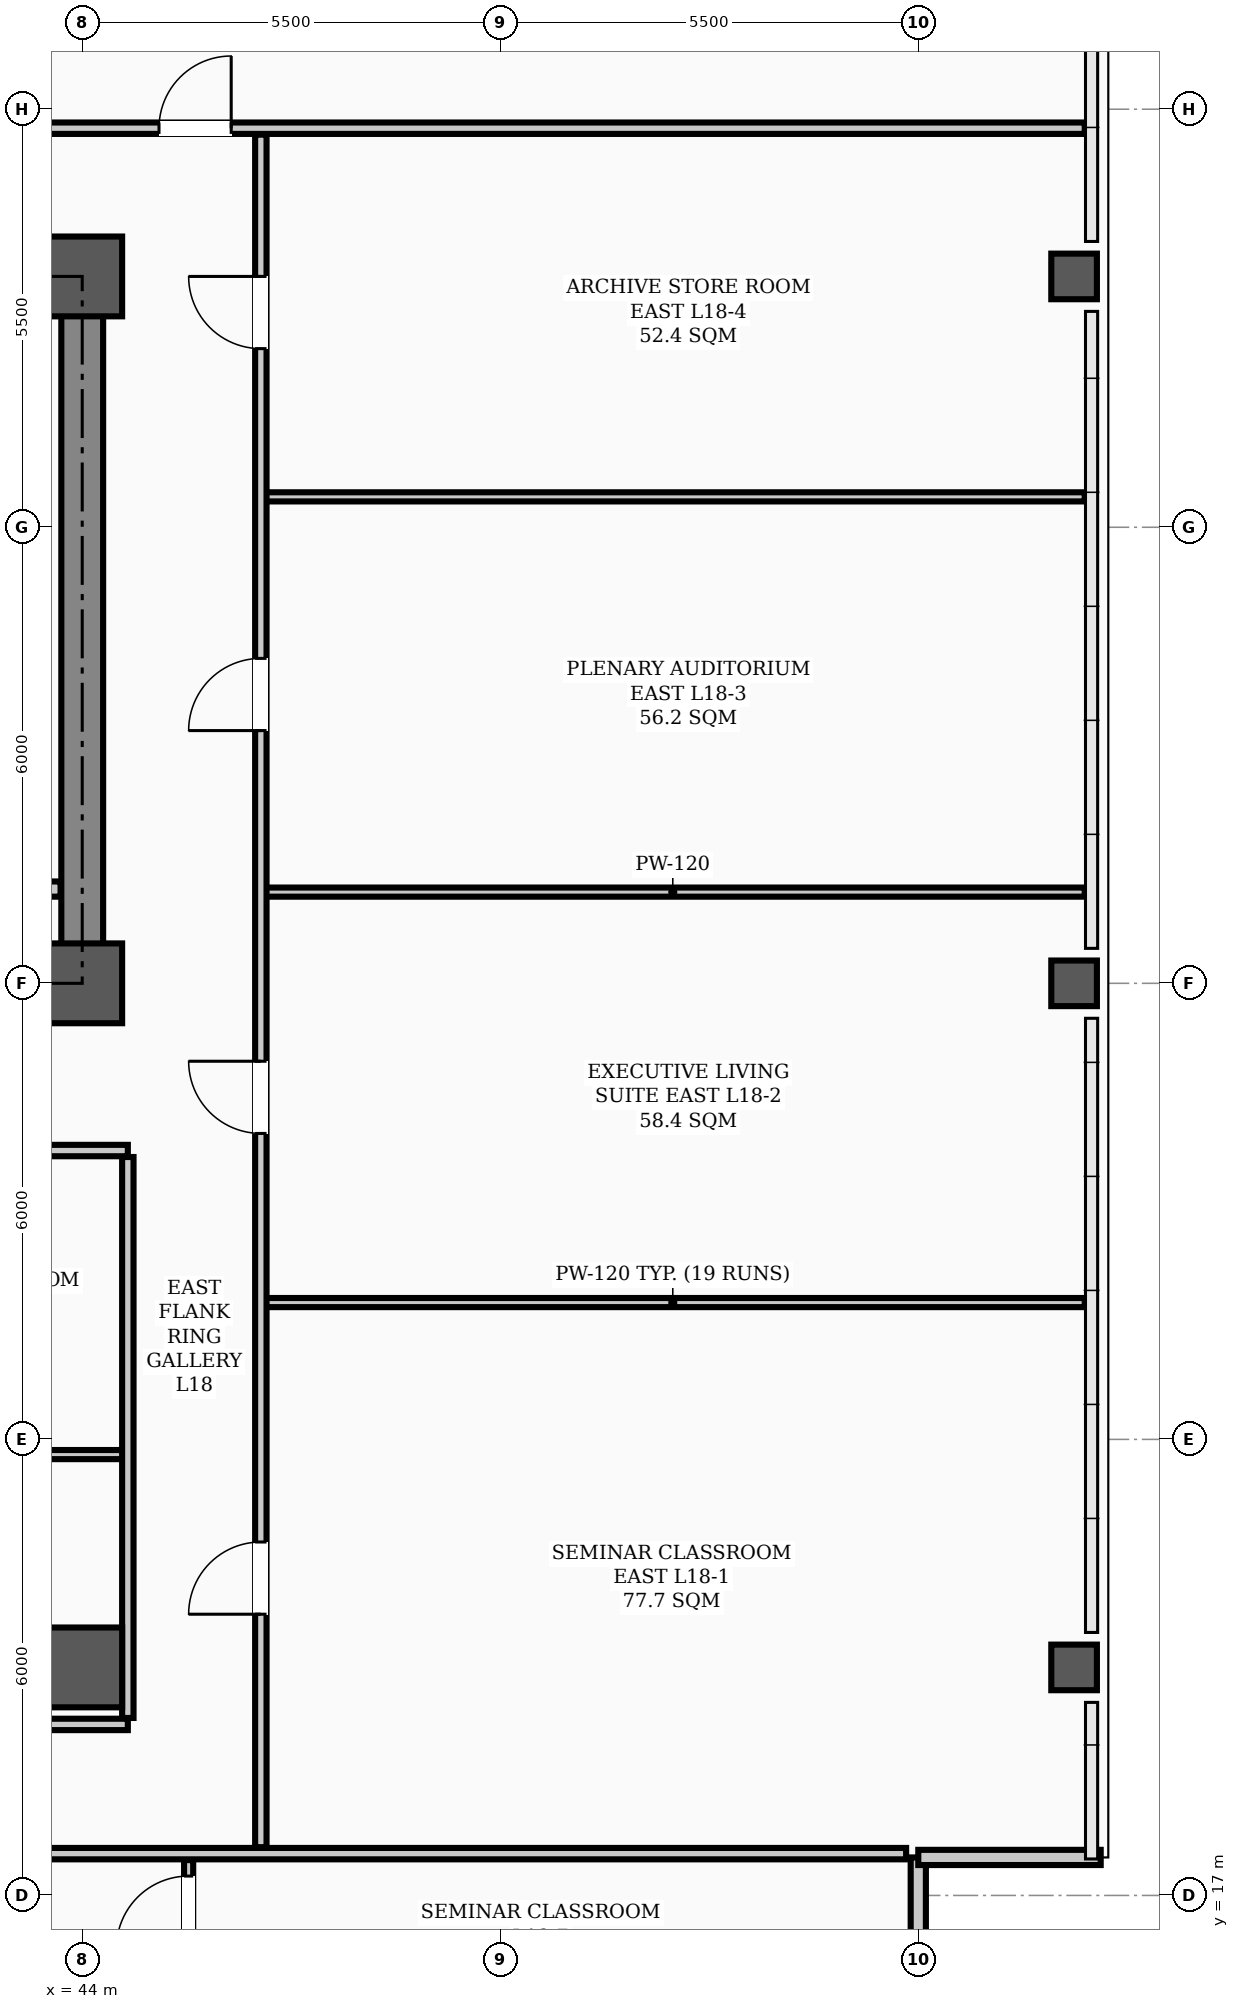
"""IFC4 building model, lengths in metres.
Left out: names, types, materials, properties, quantities, classifications, styles, units other than length and angle.
Written with IfcOpenShell. Run it as: python <this file> out.ifc"""

import sys

from ifc_helpers import new_model, si_unit, direction, frame, frame_2d, origin, origin_2d, place, context, subcontext, project, spatial, rectangle, hollow_rectangle, extrude, element, fill, save


model = new_model("IFC4")
c1 = context("Model", 3, precision=1e-05, world=origin(), true_north=direction((0.0, 1.0)))
c2 = subcontext(c1, "Body", "Model", "MODEL_VIEW")
j1 = project(units=[si_unit("LENGTHUNIT", "METRE"), si_unit("PLANEANGLEUNIT", "RADIAN")], contexts=[c1])
p1 = place(None, origin())
s1 = spatial("IfcSite", under=j1, at=p1, CompositionType="ELEMENT")
p2 = place(p1, origin())
s2 = spatial("IfcBuilding", under=s1, at=p2, CompositionType="ELEMENT")
p3 = place(p2, frame((0.0, 0.0, 73.3)))
s3 = spatial("IfcBuildingStorey", under=s2, at=p3, CompositionType="ELEMENT", Elevation=73.3)
for number, where, z_axis, x_axis in (
    (1, (44.0, 29.0, 0.0), (0.0, 0.0, 1.0), (1.0, 0.0, 0.0)),
    (2, (44.0, 38.3, 0.0), (0.0, 0.0, 1.0), (1.0, 0.0, 0.0)),
    (3, (44.0, 20.0, 0.0), (0.0, 0.0, 1.0), (1.0, 0.0, 0.0)),
):
    element("IfcColumn", number, at=place(p3, frame(where, z_axis=z_axis, x_axis=x_axis)), inside=s3, PredefinedType="COLUMN", context=c2, shape_type="SweptSolid", body=[
        extrude(hollow_rectangle(XDim=1.05, YDim=1.05, WallThickness=0.038, InnerFilletRadius=0.019, OuterFilletRadius=0.057, at=origin_2d()), origin(), (0.0, 0.0, 1.0), 3.9),
    ])
for number, where, z_axis, x_axis in (
    (4, (57.05, 20.0, 0.0), (0.0, 0.0, 1.0), (1.0, 0.0, 0.0)),
    (5, (57.05, 29.0, 0.0), (0.0, 0.0, 1.0), (1.0, 0.0, 0.0)),
    (6, (57.05, 38.3, 0.0), (0.0, 0.0, 1.0), (1.0, 0.0, 0.0)),
):
    element("IfcColumn", number, at=place(p3, frame(where, z_axis=z_axis, x_axis=x_axis)), inside=s3, PredefinedType="COLUMN", context=c2, shape_type="SweptSolid", body=[
        extrude(hollow_rectangle(XDim=0.6, YDim=0.6, WallThickness=0.026, InnerFilletRadius=0.013, OuterFilletRadius=0.039, at=origin_2d()), origin(), (0.0, 0.0, 1.0), 3.9),
    ])
for number, where, z_axis, x_axis in (
    (7, (55.0, 15.1, 0.0), (0.0, 0.0, 1.0), (0.0, 1.0, 0.0)),
    (8, (55.0, 17.5, 0.0), (0.0, 0.0, 1.0), (1.0, 0.0, 0.0)),
):
    element("IfcWall", number, at=place(p3, frame(where, z_axis=z_axis, x_axis=x_axis)), inside=s3, PredefinedType="PARAPET", context=c2, shape_type="SweptSolid", body=[
        extrude(rectangle(XDim=2.4, YDim=0.2, at=frame_2d((1.2, 0.0))), origin(), (0.0, 0.0, 1.0), 1.2),
    ])
p4 = place(p3, frame((13.5, 29.0, 0.0), z_axis=(0.0, 0.0, 1.0), x_axis=(1.0, 0.0, 0.0)))
e9 = element("IfcWall", 9, at=p4, inside=s3, PredefinedType="SHEAR", context=c2, shape_type="SweptSolid", body=[
    extrude(rectangle(XDim=30.5, YDim=0.55, at=frame_2d((15.25, 0.0))), origin(), (0.0, 0.0, 1.0), 3.72),
])
p5 = place(p4, frame((1.75, 0.0, 0.0)))
e10 = element("IfcOpeningElement", 10, at=p5, cuts=e9, PredefinedType="OPENING", context=c2, shape_type="SweptSolid", body=[
    extrude(rectangle(XDim=1.1, YDim=2.08, at=frame_2d((0.55, 1.04))), frame((0.0, 0.285, 0.0), z_axis=(0.0, -1.0, 0.0), x_axis=(1.0, 0.0, 0.0)), (0.0, 0.0, 1.0), 0.57),
])
p6 = place(p4, frame((26.7, 0.0, 0.0)))
e11 = element("IfcOpeningElement", 11, at=p6, cuts=e9, PredefinedType="OPENING", context=c2, shape_type="SweptSolid", body=[
    extrude(rectangle(XDim=1.1, YDim=2.08, at=frame_2d((0.55, 1.04))), frame((0.0, 0.285, 0.0), z_axis=(0.0, -1.0, 0.0), x_axis=(1.0, 0.0, 0.0)), (0.0, 0.0, 1.0), 0.57),
])
p7 = place(p4, frame((6.8, 0.0, 0.0)))
e12 = element("IfcOpeningElement", 12, at=p7, cuts=e9, PredefinedType="OPENING", context=c2, shape_type="SweptSolid", body=[
    extrude(rectangle(XDim=1.1, YDim=2.08, at=frame_2d((0.55, 1.04))), frame((0.0, 0.285, 0.0), z_axis=(0.0, -1.0, 0.0), x_axis=(1.0, 0.0, 0.0)), (0.0, 0.0, 1.0), 0.57),
])
p8 = place(p4, frame((13.2, 0.0, 0.0)))
e13 = element("IfcOpeningElement", 13, at=p8, cuts=e9, PredefinedType="OPENING", context=c2, shape_type="SweptSolid", body=[
    extrude(rectangle(XDim=1.6, YDim=2.08, at=frame_2d((0.8, 1.04))), frame((0.0, 0.285, 0.0), z_axis=(0.0, -1.0, 0.0), x_axis=(1.0, 0.0, 0.0)), (0.0, 0.0, 1.0), 0.57),
])
p9 = place(p4, frame((20.525, 0.0, 0.0)))
e14 = element("IfcOpeningElement", 14, at=p9, cuts=e9, PredefinedType="OPENING", context=c2, shape_type="SweptSolid", body=[
    extrude(rectangle(XDim=0.95, YDim=2.08, at=frame_2d((0.475, 1.04))), frame((0.0, 0.285, 0.0), z_axis=(0.0, -1.0, 0.0), x_axis=(1.0, 0.0, 0.0)), (0.0, 0.0, 1.0), 0.57),
])
p10 = place(p3, frame((13.5, 38.3, 0.0), z_axis=(0.0, 0.0, 1.0), x_axis=(1.0, 0.0, 0.0)))
e15 = element("IfcWall", 15, at=p10, inside=s3, PredefinedType="SHEAR", context=c2, shape_type="SweptSolid", body=[
    extrude(rectangle(XDim=30.5, YDim=0.55, at=frame_2d((15.25, 0.0))), origin(), (0.0, 0.0, 1.0), 3.72),
])
p11 = place(p3, frame((44.0, 29.35, 0.0), z_axis=(0.0, 0.0, 1.0), x_axis=(0.0, 1.0, 0.0)))
e16 = element("IfcWall", 16, at=p11, inside=s3, PredefinedType="SHEAR", context=c2, shape_type="SweptSolid", body=[
    extrude(rectangle(XDim=8.6, YDim=0.55, at=frame_2d((4.3, 0.0))), origin(), (0.0, 0.0, 1.0), 3.72),
])
p12 = place(p3, frame((42.4, 30.24, 0.0), z_axis=(0.0, 0.0, 1.0), x_axis=(1.0, 0.0, 0.0)))
e17 = element("IfcWall", 17, at=p12, inside=s3, PredefinedType="STANDARD", context=c2, shape_type="SweptSolid", body=[
    extrude(rectangle(XDim=1.315, YDim=0.2, at=frame_2d((0.658, 0.0))), origin(), (0.0, 0.0, 1.0), 3.1),
])
p13 = place(p3, frame((12.9, 26.8, 0.0), z_axis=(0.0, 0.0, 1.0), x_axis=(1.0, 0.0, 0.0)))
e18 = element("IfcWall", 18, at=p13, inside=s3, PredefinedType="PARTITIONING", context=c2, shape_type="SweptSolid", body=[
    extrude(rectangle(XDim=31.7, YDim=0.15, at=frame_2d((15.85, 0.0))), origin(), (0.0, 0.0, 1.0), 3.1),
])
p14 = place(p13, frame((13.6, 0.0, 0.0)))
e19 = element("IfcOpeningElement", 19, at=p14, cuts=e18, PredefinedType="OPENING", context=c2, shape_type="SweptSolid", body=[
    extrude(rectangle(XDim=1.6, YDim=2.08, at=frame_2d((0.8, 1.04))), frame((0.0, 0.085, 0.0), z_axis=(0.0, -1.0, 0.0), x_axis=(1.0, 0.0, 0.0)), (0.0, 0.0, 1.0), 0.17),
])
p15 = place(p13, frame((2.475, 0.0, 0.0)))
e20 = element("IfcOpeningElement", 20, at=p15, cuts=e18, PredefinedType="OPENING", context=c2, shape_type="SweptSolid", body=[
    extrude(rectangle(XDim=0.95, YDim=2.08, at=frame_2d((0.475, 1.04))), frame((0.0, 0.085, 0.0), z_axis=(0.0, -1.0, 0.0), x_axis=(1.0, 0.0, 0.0)), (0.0, 0.0, 1.0), 0.17),
])
p16 = place(p13, frame((9.125, 0.0, 0.0)))
e21 = element("IfcOpeningElement", 21, at=p16, cuts=e18, PredefinedType="OPENING", context=c2, shape_type="SweptSolid", body=[
    extrude(rectangle(XDim=0.95, YDim=2.08, at=frame_2d((0.475, 1.04))), frame((0.0, 0.085, 0.0), z_axis=(0.0, -1.0, 0.0), x_axis=(1.0, 0.0, 0.0)), (0.0, 0.0, 1.0), 0.17),
])
p17 = place(p13, frame((19.125, 0.0, 0.0)))
e22 = element("IfcOpeningElement", 22, at=p17, cuts=e18, PredefinedType="OPENING", context=c2, shape_type="SweptSolid", body=[
    extrude(rectangle(XDim=0.95, YDim=2.08, at=frame_2d((0.475, 1.04))), frame((0.0, 0.085, 0.0), z_axis=(0.0, -1.0, 0.0), x_axis=(1.0, 0.0, 0.0)), (0.0, 0.0, 1.0), 0.17),
])
p18 = place(p13, frame((26.325, 0.0, 0.0)))
e23 = element("IfcOpeningElement", 23, at=p18, cuts=e18, PredefinedType="OPENING", context=c2, shape_type="SweptSolid", body=[
    extrude(rectangle(XDim=0.95, YDim=2.08, at=frame_2d((0.475, 1.04))), frame((0.0, 0.085, 0.0), z_axis=(0.0, -1.0, 0.0), x_axis=(1.0, 0.0, 0.0)), (0.0, 0.0, 1.0), 0.17),
])
p19 = place(p3, frame((10.16, 17.55, 0.0), z_axis=(0.0, 0.0, 1.0), x_axis=(1.0, 0.0, 0.0)))
e24 = element("IfcWall", 24, at=p19, inside=s3, PredefinedType="PARTITIONING", context=c2, shape_type="SweptSolid", body=[
    extrude(rectangle(XDim=44.68, YDim=0.15, at=frame_2d((22.34, 0.0))), origin(), (0.0, 0.0, 1.0), 3.1),
])
p20 = place(p19, frame((2.04, 0.0, 0.0)))
e25 = element("IfcOpeningElement", 25, at=p20, cuts=e24, PredefinedType="OPENING", context=c2, shape_type="SweptSolid", body=[
    extrude(rectangle(XDim=0.95, YDim=2.08, at=frame_2d((0.475, 1.04))), frame((0.0, 0.085, 0.0), z_axis=(0.0, -1.0, 0.0), x_axis=(1.0, 0.0, 0.0)), (0.0, 0.0, 1.0), 0.17),
])
p21 = place(p19, frame((6.565, 0.0, 0.0)))
e26 = element("IfcOpeningElement", 26, at=p21, cuts=e24, PredefinedType="OPENING", context=c2, shape_type="SweptSolid", body=[
    extrude(rectangle(XDim=0.95, YDim=2.08, at=frame_2d((0.475, 1.04))), frame((0.0, 0.085, 0.0), z_axis=(0.0, -1.0, 0.0), x_axis=(1.0, 0.0, 0.0)), (0.0, 0.0, 1.0), 0.17),
])
p22 = place(p19, frame((11.865, 0.0, 0.0)))
e27 = element("IfcOpeningElement", 27, at=p22, cuts=e24, PredefinedType="OPENING", context=c2, shape_type="SweptSolid", body=[
    extrude(rectangle(XDim=0.95, YDim=2.08, at=frame_2d((0.475, 1.04))), frame((0.0, 0.085, 0.0), z_axis=(0.0, -1.0, 0.0), x_axis=(1.0, 0.0, 0.0)), (0.0, 0.0, 1.0), 0.17),
])
p23 = place(p19, frame((24.665, 0.0, 0.0)))
e28 = element("IfcOpeningElement", 28, at=p23, cuts=e24, PredefinedType="OPENING", context=c2, shape_type="SweptSolid", body=[
    extrude(rectangle(XDim=0.95, YDim=2.08, at=frame_2d((0.475, 1.04))), frame((0.0, 0.085, 0.0), z_axis=(0.0, -1.0, 0.0), x_axis=(1.0, 0.0, 0.0)), (0.0, 0.0, 1.0), 0.17),
])
p24 = place(p19, frame((31.765, 0.0, 0.0)))
e29 = element("IfcOpeningElement", 29, at=p24, cuts=e24, PredefinedType="OPENING", context=c2, shape_type="SweptSolid", body=[
    extrude(rectangle(XDim=0.95, YDim=2.08, at=frame_2d((0.475, 1.04))), frame((0.0, 0.085, 0.0), z_axis=(0.0, -1.0, 0.0), x_axis=(1.0, 0.0, 0.0)), (0.0, 0.0, 1.0), 0.17),
])
p25 = place(p3, frame((28.4, 19.25, 0.0), z_axis=(0.0, 0.0, 1.0), x_axis=(1.0, 0.0, 0.0)))
e30 = element("IfcWall", 30, at=p25, inside=s3, PredefinedType="PARTITIONING", context=c2, shape_type="SweptSolid", body=[
    extrude(rectangle(XDim=16.2, YDim=0.15, at=frame_2d((8.1, 0.0))), origin(), (0.0, 0.0, 1.0), 3.1),
])
p26 = place(p25, frame((3.625, 0.0, 0.0)))
e31 = element("IfcOpeningElement", 31, at=p26, cuts=e30, PredefinedType="OPENING", context=c2, shape_type="SweptSolid", body=[
    extrude(rectangle(XDim=0.95, YDim=2.08, at=frame_2d((0.475, 1.04))), frame((0.0, 0.085, 0.0), z_axis=(0.0, -1.0, 0.0), x_axis=(1.0, 0.0, 0.0)), (0.0, 0.0, 1.0), 0.17),
])
p27 = place(p25, frame((10.825, 0.0, 0.0)))
e32 = element("IfcOpeningElement", 32, at=p27, cuts=e30, PredefinedType="OPENING", context=c2, shape_type="SweptSolid", body=[
    extrude(rectangle(XDim=0.95, YDim=2.08, at=frame_2d((0.475, 1.04))), frame((0.0, 0.085, 0.0), z_axis=(0.0, -1.0, 0.0), x_axis=(1.0, 0.0, 0.0)), (0.0, 0.0, 1.0), 0.17),
])
p28 = place(p3, frame((34.8, 22.8, 0.0), z_axis=(0.0, 0.0, 1.0), x_axis=(1.0, 0.0, 0.0)))
e33 = element("IfcWall", 33, at=p28, inside=s3, PredefinedType="PARTITIONING", context=c2, shape_type="SweptSolid", body=[
    extrude(rectangle(XDim=9.8, YDim=0.12, at=frame_2d((4.9, 0.0))), origin(), (0.0, 0.0, 1.0), 3.1),
])
for number, where, z_axis, x_axis in (
    (34, (46.35, 24.8, 0.0), (0.0, 0.0, 1.0), (1.0, 0.0, 0.0)),
    (35, (46.35, 30.2, 0.0), (0.0, 0.0, 1.0), (1.0, 0.0, 0.0)),
    (36, (46.35, 35.4, 0.0), (0.0, 0.0, 1.0), (1.0, 0.0, 0.0)),
):
    element("IfcWall", number, at=place(p3, frame(where, z_axis=z_axis, x_axis=x_axis)), inside=s3, PredefinedType="PARTITIONING", context=c2, shape_type="SweptSolid", body=[
        extrude(rectangle(XDim=10.84, YDim=0.12, at=frame_2d((5.42, 0.0))), origin(), (0.0, 0.0, 1.0), 3.212),
    ])
p29 = place(p3, frame((7.81, 40.25, 0.0), z_axis=(0.0, 0.0, 1.0), x_axis=(1.0, 0.0, 0.0)))
e37 = element("IfcWall", 37, at=p29, inside=s3, PredefinedType="PARTITIONING", context=c2, shape_type="SweptSolid", body=[
    extrude(rectangle(XDim=49.38, YDim=0.15, at=frame_2d((24.69, 0.0))), origin(), (0.0, 0.0, 1.0), 3.1),
])
p30 = place(p29, frame((3.73, 0.0, 0.0)))
e38 = element("IfcOpeningElement", 38, at=p30, cuts=e37, PredefinedType="OPENING", context=c2, shape_type="SweptSolid", body=[
    extrude(rectangle(XDim=0.95, YDim=2.08, at=frame_2d((0.475, 1.04))), frame((0.0, 0.085, 0.0), z_axis=(0.0, -1.0, 0.0), x_axis=(1.0, 0.0, 0.0)), (0.0, 0.0, 1.0), 0.17),
])
p31 = place(p29, frame((11.015, 0.0, 0.0)))
e39 = element("IfcOpeningElement", 39, at=p31, cuts=e37, PredefinedType="OPENING", context=c2, shape_type="SweptSolid", body=[
    extrude(rectangle(XDim=0.95, YDim=2.08, at=frame_2d((0.475, 1.04))), frame((0.0, 0.085, 0.0), z_axis=(0.0, -1.0, 0.0), x_axis=(1.0, 0.0, 0.0)), (0.0, 0.0, 1.0), 0.17),
])
p32 = place(p29, frame((18.215, 0.0, 0.0)))
e40 = element("IfcOpeningElement", 40, at=p32, cuts=e37, PredefinedType="OPENING", context=c2, shape_type="SweptSolid", body=[
    extrude(rectangle(XDim=0.95, YDim=2.08, at=frame_2d((0.475, 1.04))), frame((0.0, 0.085, 0.0), z_axis=(0.0, -1.0, 0.0), x_axis=(1.0, 0.0, 0.0)), (0.0, 0.0, 1.0), 0.17),
])
p33 = place(p29, frame((25.515, 0.0, 0.0)))
e41 = element("IfcOpeningElement", 41, at=p33, cuts=e37, PredefinedType="OPENING", context=c2, shape_type="SweptSolid", body=[
    extrude(rectangle(XDim=0.95, YDim=2.08, at=frame_2d((0.475, 1.04))), frame((0.0, 0.085, 0.0), z_axis=(0.0, -1.0, 0.0), x_axis=(1.0, 0.0, 0.0)), (0.0, 0.0, 1.0), 0.17),
])
p34 = place(p29, frame((31.915, 0.0, 0.0)))
e42 = element("IfcOpeningElement", 42, at=p34, cuts=e37, PredefinedType="OPENING", context=c2, shape_type="SweptSolid", body=[
    extrude(rectangle(XDim=0.95, YDim=2.08, at=frame_2d((0.475, 1.04))), frame((0.0, 0.085, 0.0), z_axis=(0.0, -1.0, 0.0), x_axis=(1.0, 0.0, 0.0)), (0.0, 0.0, 1.0), 0.17),
])
p35 = place(p29, frame((37.2, 0.0, 0.0)))
e43 = element("IfcOpeningElement", 43, at=p35, cuts=e37, PredefinedType="OPENING", context=c2, shape_type="SweptSolid", body=[
    extrude(rectangle(XDim=0.95, YDim=2.08, at=frame_2d((0.475, 1.04))), frame((0.0, 0.085, 0.0), z_axis=(0.0, -1.0, 0.0), x_axis=(1.0, 0.0, 0.0)), (0.0, 0.0, 1.0), 0.17),
])
p36 = place(p3, frame((46.35, 17.635, 0.0), z_axis=(0.0, 0.0, 1.0), x_axis=(0.0, 1.0, 0.0)))
e44 = element("IfcWall", 44, at=p36, inside=s3, PredefinedType="PARTITIONING", context=c2, shape_type="SweptSolid", body=[
    extrude(rectangle(XDim=22.53, YDim=0.15, at=frame_2d((11.265, 0.0))), origin(), (0.0, 0.0, 1.0), 3.0),
])
p37 = place(p36, frame((3.065, 0.0, 0.0)))
e45 = element("IfcOpeningElement", 45, at=p37, cuts=e44, PredefinedType="OPENING", context=c2, shape_type="SweptSolid", body=[
    extrude(rectangle(XDim=0.95, YDim=2.08, at=frame_2d((0.475, 1.04))), frame((0.0, 0.085, 0.0), z_axis=(0.0, -1.0, 0.0), x_axis=(1.0, 0.0, 0.0)), (0.0, 0.0, 1.0), 0.17),
])
p38 = place(p36, frame((9.39, 0.0, 0.0)))
e46 = element("IfcOpeningElement", 46, at=p38, cuts=e44, PredefinedType="OPENING", context=c2, shape_type="SweptSolid", body=[
    extrude(rectangle(XDim=0.95, YDim=2.08, at=frame_2d((0.475, 1.04))), frame((0.0, 0.085, 0.0), z_axis=(0.0, -1.0, 0.0), x_axis=(1.0, 0.0, 0.0)), (0.0, 0.0, 1.0), 0.17),
])
p39 = place(p36, frame((14.69, 0.0, 0.0)))
e47 = element("IfcOpeningElement", 47, at=p39, cuts=e44, PredefinedType="OPENING", context=c2, shape_type="SweptSolid", body=[
    extrude(rectangle(XDim=0.95, YDim=2.08, at=frame_2d((0.475, 1.04))), frame((0.0, 0.085, 0.0), z_axis=(0.0, -1.0, 0.0), x_axis=(1.0, 0.0, 0.0)), (0.0, 0.0, 1.0), 0.17),
])
p40 = place(p36, frame((19.715, 0.0, 0.0)))
e48 = element("IfcOpeningElement", 48, at=p40, cuts=e44, PredefinedType="OPENING", context=c2, shape_type="SweptSolid", body=[
    extrude(rectangle(XDim=0.95, YDim=2.08, at=frame_2d((0.475, 1.04))), frame((0.0, 0.085, 0.0), z_axis=(0.0, -1.0, 0.0), x_axis=(1.0, 0.0, 0.0)), (0.0, 0.0, 1.0), 0.17),
])
p41 = place(p3, frame((44.6, 19.335, 0.0), z_axis=(0.0, 0.0, 1.0), x_axis=(0.0, 1.0, 0.0)))
e49 = element("IfcWall", 49, at=p41, inside=s3, PredefinedType="PARTITIONING", context=c2, shape_type="SweptSolid", body=[
    extrude(rectangle(XDim=7.38, YDim=0.15, at=frame_2d((3.69, 0.0))), origin(), (0.0, 0.0, 1.0), 3.0),
])
p42 = place(p3, frame((45.4, 15.31, 0.0), z_axis=(0.0, 0.0, 1.0), x_axis=(0.0, 1.0, 0.0)))
e50 = element("IfcWall", 50, at=p42, inside=s3, PredefinedType="PARTITIONING", context=c2, shape_type="SweptSolid", body=[
    extrude(rectangle(XDim=2.155, YDim=0.12, at=frame_2d((1.078, 0.0))), origin(), (0.0, 0.0, 1.0), 3.72),
])
p43 = place(p42, frame((0.995, 0.0, 0.0)))
e51 = element("IfcOpeningElement", 51, at=p43, cuts=e50, PredefinedType="OPENING", context=c2, shape_type="SweptSolid", body=[
    extrude(rectangle(XDim=0.95, YDim=2.08, at=frame_2d((0.475, 1.04))), frame((0.0, 0.07, 0.0), z_axis=(0.0, -1.0, 0.0), x_axis=(1.0, 0.0, 0.0)), (0.0, 0.0, 1.0), 0.14),
])
p44 = place(p43, origin())
e52 = element("IfcDoor", 52, at=p44, inside=s3, OperationType="SINGLE_SWING_LEFT", PredefinedType="DOOR", context=c2, shape_type="SweptSolid", body=[
    extrude(rectangle(XDim=0.95, YDim=2.08, at=frame_2d((0.475, 1.04))), frame((0.0, 0.025, 0.0), z_axis=(0.0, -1.0, 0.0), x_axis=(1.0, 0.0, 0.0)), (0.0, 0.0, 1.0), 0.05),
])
fill(e51, e52)
p45 = place(p37, origin())
e53 = element("IfcDoor", 53, at=p45, inside=s3, OperationType="SINGLE_SWING_LEFT", PredefinedType="DOOR", context=c2, shape_type="SweptSolid", body=[
    extrude(rectangle(XDim=0.95, YDim=2.08, at=frame_2d((0.475, 1.04))), frame((0.0, 0.025, 0.0), z_axis=(0.0, -1.0, 0.0), x_axis=(1.0, 0.0, 0.0)), (0.0, 0.0, 1.0), 0.05),
])
fill(e45, e53)
p46 = place(p38, origin())
e54 = element("IfcDoor", 54, at=p46, inside=s3, OperationType="SINGLE_SWING_RIGHT", PredefinedType="DOOR", context=c2, shape_type="SweptSolid", body=[
    extrude(rectangle(XDim=0.95, YDim=2.08, at=frame_2d((0.475, 1.04))), frame((0.0, 0.025, 0.0), z_axis=(0.0, -1.0, 0.0), x_axis=(1.0, 0.0, 0.0)), (0.0, 0.0, 1.0), 0.05),
])
fill(e46, e54)
p47 = place(p39, origin())
e55 = element("IfcDoor", 55, at=p47, inside=s3, OperationType="SINGLE_SWING_LEFT", PredefinedType="DOOR", context=c2, shape_type="SweptSolid", body=[
    extrude(rectangle(XDim=0.95, YDim=2.08, at=frame_2d((0.475, 1.04))), frame((0.0, 0.025, 0.0), z_axis=(0.0, -1.0, 0.0), x_axis=(1.0, 0.0, 0.0)), (0.0, 0.0, 1.0), 0.05),
])
fill(e47, e55)
p48 = place(p40, origin())
e56 = element("IfcDoor", 56, at=p48, inside=s3, OperationType="SINGLE_SWING_RIGHT", PredefinedType="DOOR", context=c2, shape_type="SweptSolid", body=[
    extrude(rectangle(XDim=0.95, YDim=2.08, at=frame_2d((0.475, 1.04))), frame((0.0, 0.025, 0.0), z_axis=(0.0, -1.0, 0.0), x_axis=(1.0, 0.0, 0.0)), (0.0, 0.0, 1.0), 0.05),
])
fill(e48, e56)
p49 = place(p35, origin())
e57 = element("IfcDoor", 57, at=p49, inside=s3, OperationType="SINGLE_SWING_RIGHT", PredefinedType="DOOR", context=c2, shape_type="SweptSolid", body=[
    extrude(rectangle(XDim=0.95, YDim=2.08, at=frame_2d((0.475, 1.04))), frame((0.0, 0.025, 0.0), z_axis=(0.0, -1.0, 0.0), x_axis=(1.0, 0.0, 0.0)), (0.0, 0.0, 1.0), 0.05),
])
fill(e43, e57)
save(model, sys.argv[1])
